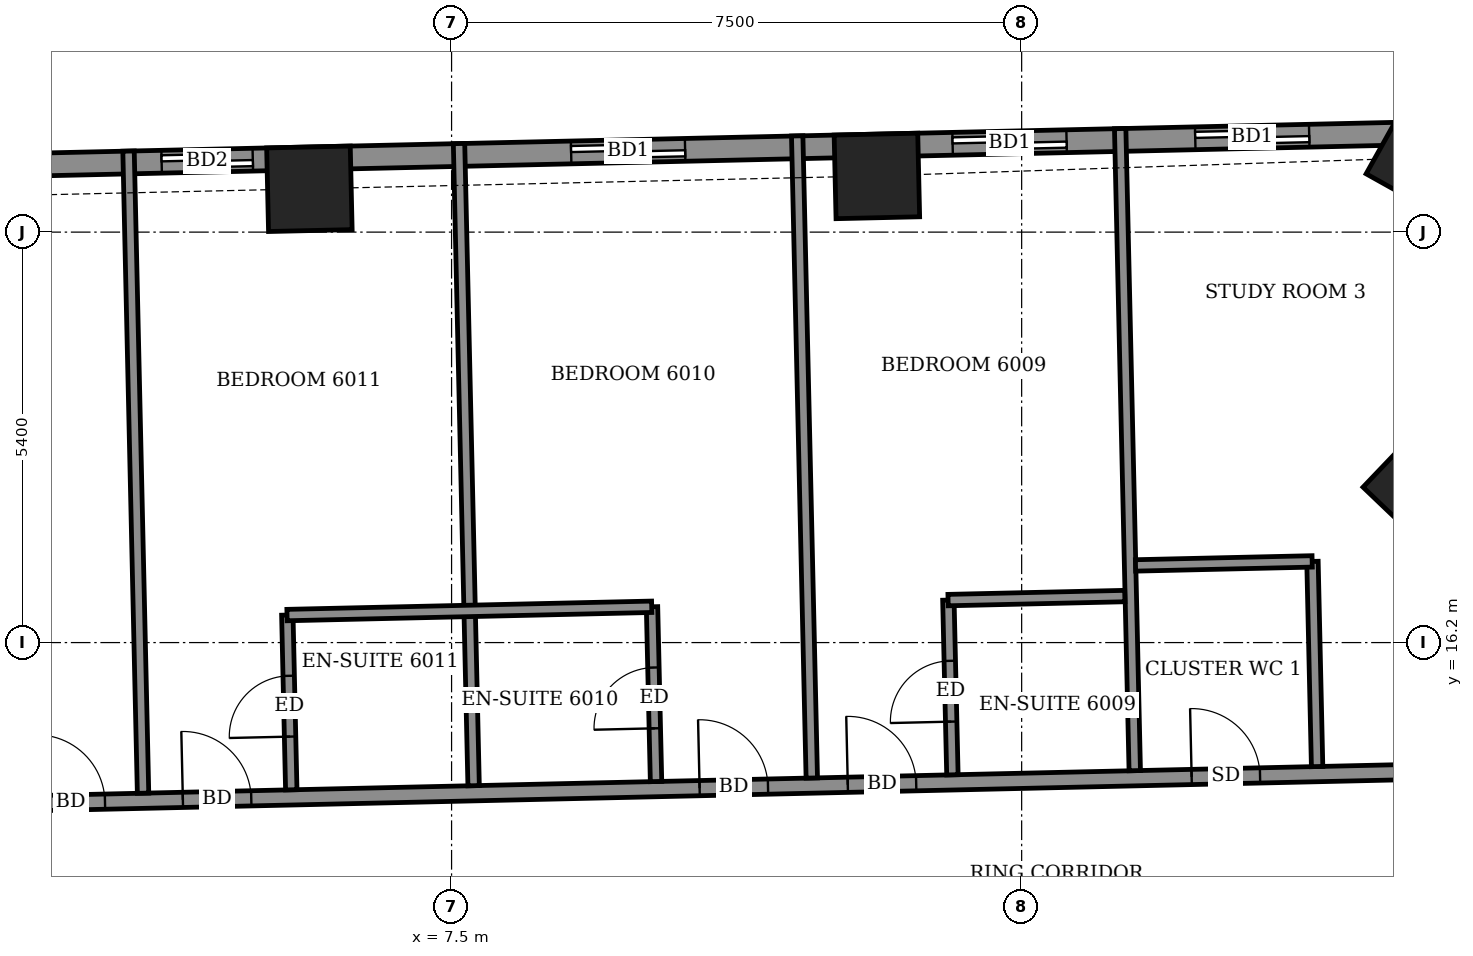
"""IFC4 building model, lengths in metres.
Left out: names, types, materials, properties, quantities, classifications, styles, units other than length and angle.
Written with IfcOpenShell. Run it as: python <this file> out.ifc"""

import sys

from ifc_helpers import new_model, si_unit, direction, frame, frame_2d, origin, origin_2d, place, context, subcontext, project, spatial, rectangle, extrude, element, fill, save


model = new_model("IFC4")
c1 = context("Model", 3, precision=1e-05, world=origin(), true_north=direction((0.0, 1.0)))
c2 = subcontext(c1, "Body", "Model", "MODEL_VIEW")
j1 = project(units=[si_unit("LENGTHUNIT", "METRE"), si_unit("PLANEANGLEUNIT", "RADIAN")], contexts=[c1])
p1 = place(None, origin())
s1 = spatial("IfcSite", under=j1, at=p1, CompositionType="ELEMENT")
p2 = place(p1, origin())
s2 = spatial("IfcBuilding", under=s1, at=p2, CompositionType="ELEMENT")
p3 = place(p2, frame((0.0, 0.0, 238.3)))
s3 = spatial("IfcBuildingStorey", under=s2, at=p3, CompositionType="ELEMENT", Elevation=238.3)
for number, where, z_axis, x_axis in (
    (1, (20.269, 18.262, -0.55), (0.0, 0.0, 1.0), (-0.723, 0.691, 0.0)),
    (2, (20.281, 22.579, -0.55), (0.0, 0.0, 1.0), (-0.873, 0.488, 0.0)),
    (3, (13.095, 22.339, -0.55), (0.0, 0.0, 1.0), (-1.0, -0.023, 0.0)),
    (4, (5.629, 22.17, -0.55), (0.0, 0.0, 1.0), (-1.0, -0.023, 0.0)),
):
    element("IfcColumn", number, at=place(p3, frame(where, z_axis=z_axis, x_axis=x_axis)), inside=s3, PredefinedType="COLUMN", context=c2, shape_type="SweptSolid", body=[
        extrude(rectangle(XDim=1.1, YDim=1.1, at=origin_2d()), origin(), (0.0, 0.0, 1.0), 3.6),
    ])
p4 = place(p3, frame((20.403, 22.905, 0.0), z_axis=(0.0, 0.0, 1.0), x_axis=(-0.99974298964, -0.022670568288, 0.0)))
e5 = element("IfcWall", 5, at=p4, inside=s3, PredefinedType="SOLIDWALL", context=c2, shape_type="SweptSolid", body=[
    extrude(rectangle(XDim=44.509, YDim=0.3, at=frame_2d((22.254, 0.0))), origin(), (0.0, 0.0, 1.0), 2.55),
])
p5 = place(p4, frame((1.62, 0.0, 0.0)))
e6 = element("IfcOpeningElement", 6, at=p5, cuts=e5, PredefinedType="OPENING", context=c2, shape_type="SweptSolid", body=[
    extrude(rectangle(XDim=1.5, YDim=2.4, at=frame_2d((0.75, 1.2))), frame((0.0, 0.16, 0.0), z_axis=(0.0, -1.0, 0.0), x_axis=(1.0, 0.0, 0.0)), (0.0, 0.0, 1.0), 0.32),
])
p6 = place(p4, frame((4.813, 0.0, 0.0)))
e7 = element("IfcOpeningElement", 7, at=p6, cuts=e5, PredefinedType="OPENING", context=c2, shape_type="SweptSolid", body=[
    extrude(rectangle(XDim=1.5, YDim=2.4, at=frame_2d((0.75, 1.2))), frame((0.0, 0.16, 0.0), z_axis=(0.0, -1.0, 0.0), x_axis=(1.0, 0.0, 0.0)), (0.0, 0.0, 1.0), 0.32),
])
p7 = place(p4, frame((9.833, 0.0, 0.0)))
e8 = element("IfcOpeningElement", 8, at=p7, cuts=e5, PredefinedType="OPENING", context=c2, shape_type="SweptSolid", body=[
    extrude(rectangle(XDim=1.5, YDim=2.4, at=frame_2d((0.75, 1.2))), frame((0.0, 0.16, 0.0), z_axis=(0.0, -1.0, 0.0), x_axis=(1.0, 0.0, 0.0)), (0.0, 0.0, 1.0), 0.32),
])
p8 = place(p4, frame((15.522, 0.0, 0.0)))
e9 = element("IfcOpeningElement", 9, at=p8, cuts=e5, PredefinedType="OPENING", context=c2, shape_type="SweptSolid", body=[
    extrude(rectangle(XDim=1.2, YDim=2.4, at=frame_2d((0.6, 1.2))), frame((0.0, 0.16, 0.0), z_axis=(0.0, -1.0, 0.0), x_axis=(1.0, 0.0, 0.0)), (0.0, 0.0, 1.0), 0.32),
])
p9 = place(p4, frame((18.558, 0.0, 0.0)))
e10 = element("IfcOpeningElement", 10, at=p9, cuts=e5, PredefinedType="OPENING", context=c2, shape_type="SweptSolid", body=[
    extrude(rectangle(XDim=1.5, YDim=2.4, at=frame_2d((0.75, 1.2))), frame((0.0, 0.16, 0.0), z_axis=(0.0, -1.0, 0.0), x_axis=(1.0, 0.0, 0.0)), (0.0, 0.0, 1.0), 0.32),
])
p10 = place(p4, frame((23.456, 0.0, 0.0)))
e11 = element("IfcOpeningElement", 11, at=p10, cuts=e5, PredefinedType="OPENING", context=c2, shape_type="SweptSolid", body=[
    extrude(rectangle(XDim=1.5, YDim=2.4, at=frame_2d((0.75, 1.2))), frame((0.0, 0.16, 0.0), z_axis=(0.0, -1.0, 0.0), x_axis=(1.0, 0.0, 0.0)), (0.0, 0.0, 1.0), 0.32),
])
p11 = place(p4, frame((26.89, 0.0, 0.0)))
e12 = element("IfcOpeningElement", 12, at=p11, cuts=e5, PredefinedType="OPENING", context=c2, shape_type="SweptSolid", body=[
    extrude(rectangle(XDim=1.5, YDim=2.4, at=frame_2d((0.75, 1.2))), frame((0.0, 0.16, 0.0), z_axis=(0.0, -1.0, 0.0), x_axis=(1.0, 0.0, 0.0)), (0.0, 0.0, 1.0), 0.32),
])
p12 = place(p4, frame((31.708, 0.0, 0.0)))
e13 = element("IfcOpeningElement", 13, at=p12, cuts=e5, PredefinedType="OPENING", context=c2, shape_type="SweptSolid", body=[
    extrude(rectangle(XDim=1.5, YDim=2.4, at=frame_2d((0.75, 1.2))), frame((0.0, 0.16, 0.0), z_axis=(0.0, -1.0, 0.0), x_axis=(1.0, 0.0, 0.0)), (0.0, 0.0, 1.0), 0.32),
])
p13 = place(p4, frame((35.024, 0.0, 0.0)))
e14 = element("IfcOpeningElement", 14, at=p13, cuts=e5, PredefinedType="OPENING", context=c2, shape_type="SweptSolid", body=[
    extrude(rectangle(XDim=1.5, YDim=2.4, at=frame_2d((0.75, 1.2))), frame((0.0, 0.16, 0.0), z_axis=(0.0, -1.0, 0.0), x_axis=(1.0, 0.0, 0.0)), (0.0, 0.0, 1.0), 0.32),
])
p14 = place(p4, frame((40.173, 0.0, 0.9)))
e15 = element("IfcOpeningElement", 15, at=p14, cuts=e5, PredefinedType="OPENING", context=c2, shape_type="SweptSolid", body=[
    extrude(rectangle(XDim=2.4, YDim=1.5, at=frame_2d((1.2, 0.75))), frame((0.0, 0.16, 0.0), z_axis=(0.0, -1.0, 0.0), x_axis=(1.0, 0.0, 0.0)), (0.0, 0.0, 1.0), 0.32),
])
p15 = place(p3, frame((16.679, 12.918, 0.0), z_axis=(0.0, 0.0, 1.0), x_axis=(0.99974139269, 0.022740882632, 0.0)))
e16 = element("IfcWall", 16, at=p15, inside=s3, PredefinedType="PARTITIONING", context=c2, shape_type="SweptSolid", body=[
    extrude(rectangle(XDim=6.549, YDim=0.2, at=frame_2d((3.274, 0.0))), origin(), (0.0, 0.0, 1.0), 3.05),
])
p16 = place(p15, frame((3.75, 0.0, 0.0)))
e17 = element("IfcOpeningElement", 17, at=p16, cuts=e16, PredefinedType="OPENING", context=c2, shape_type="SweptSolid", body=[
    extrude(rectangle(XDim=1.0, YDim=2.1, at=frame_2d((0.5, 1.05))), frame((0.0, 0.11, 0.0), z_axis=(0.0, -1.0, 0.0), x_axis=(1.0, 0.0, 0.0)), (0.0, 0.0, 1.0), 0.22),
])
p17 = place(p3, frame((-27.652, 13.413, 0.0), z_axis=(0.0, 0.0, 1.0), x_axis=(0.999742610679, 0.022687273792, 0.0)))
e18 = element("IfcWall", 18, at=p17, inside=s3, PredefinedType="PARTITIONING", context=c2, shape_type="SweptSolid", body=[
    extrude(rectangle(XDim=50.857, YDim=0.2, at=frame_2d((25.429, 0.0))), origin(), (0.0, 0.0, 1.0), 3.05),
])
p18 = place(p17, frame((49.179, 0.0, 0.0)))
e19 = element("IfcOpeningElement", 19, at=p18, cuts=e18, PredefinedType="OPENING", context=c2, shape_type="SweptSolid", body=[
    extrude(rectangle(XDim=1.0, YDim=2.1, at=frame_2d((0.5, 1.05))), frame((0.0, 0.11, 0.0), z_axis=(0.0, -1.0, 0.0), x_axis=(1.0, 0.0, 0.0)), (0.0, 0.0, 1.0), 0.22),
])
p19 = place(p17, frame((44.9, 0.0, 0.0)))
e20 = element("IfcOpeningElement", 20, at=p19, cuts=e18, PredefinedType="OPENING", context=c2, shape_type="SweptSolid", body=[
    extrude(rectangle(XDim=0.9, YDim=2.1, at=frame_2d((0.45, 1.05))), frame((0.0, 0.11, 0.0), z_axis=(0.0, -1.0, 0.0), x_axis=(1.0, 0.0, 0.0)), (0.0, 0.0, 1.0), 0.22),
])
p20 = place(p17, frame((40.375, 0.0, 0.0)))
e21 = element("IfcOpeningElement", 21, at=p20, cuts=e18, PredefinedType="OPENING", context=c2, shape_type="SweptSolid", body=[
    extrude(rectangle(XDim=0.9, YDim=2.1, at=frame_2d((0.45, 1.05))), frame((0.0, 0.11, 0.0), z_axis=(0.0, -1.0, 0.0), x_axis=(1.0, 0.0, 0.0)), (0.0, 0.0, 1.0), 0.22),
])
p21 = place(p17, frame((38.425, 0.0, 0.0)))
e22 = element("IfcOpeningElement", 22, at=p21, cuts=e18, PredefinedType="OPENING", context=c2, shape_type="SweptSolid", body=[
    extrude(rectangle(XDim=0.9, YDim=2.1, at=frame_2d((0.45, 1.05))), frame((0.0, 0.11, 0.0), z_axis=(0.0, -1.0, 0.0), x_axis=(1.0, 0.0, 0.0)), (0.0, 0.0, 1.0), 0.22),
])
p22 = place(p17, frame((31.625, 0.0, 0.0)))
e23 = element("IfcOpeningElement", 23, at=p22, cuts=e18, PredefinedType="OPENING", context=c2, shape_type="SweptSolid", body=[
    extrude(rectangle(XDim=0.9, YDim=2.1, at=frame_2d((0.45, 1.05))), frame((0.0, 0.11, 0.0), z_axis=(0.0, -1.0, 0.0), x_axis=(1.0, 0.0, 0.0)), (0.0, 0.0, 1.0), 0.22),
])
p23 = place(p17, frame((29.7, 0.0, 0.0)))
e24 = element("IfcOpeningElement", 24, at=p23, cuts=e18, PredefinedType="OPENING", context=c2, shape_type="SweptSolid", body=[
    extrude(rectangle(XDim=0.9, YDim=2.1, at=frame_2d((0.45, 1.05))), frame((0.0, 0.11, 0.0), z_axis=(0.0, -1.0, 0.0), x_axis=(1.0, 0.0, 0.0)), (0.0, 0.0, 1.0), 0.22),
])
p24 = place(p17, frame((22.95, 0.0, 0.0)))
e25 = element("IfcOpeningElement", 25, at=p24, cuts=e18, PredefinedType="OPENING", context=c2, shape_type="SweptSolid", body=[
    extrude(rectangle(XDim=0.9, YDim=2.1, at=frame_2d((0.45, 1.05))), frame((0.0, 0.11, 0.0), z_axis=(0.0, -1.0, 0.0), x_axis=(1.0, 0.0, 0.0)), (0.0, 0.0, 1.0), 0.22),
])
p25 = place(p17, frame((20.95, 0.0, 0.0)))
e26 = element("IfcOpeningElement", 26, at=p25, cuts=e18, PredefinedType="OPENING", context=c2, shape_type="SweptSolid", body=[
    extrude(rectangle(XDim=0.9, YDim=2.1, at=frame_2d((0.45, 1.05))), frame((0.0, 0.11, 0.0), z_axis=(0.0, -1.0, 0.0), x_axis=(1.0, 0.0, 0.0)), (0.0, 0.0, 1.0), 0.22),
])
p26 = place(p17, frame((14.15, 0.0, 0.0)))
e27 = element("IfcOpeningElement", 27, at=p26, cuts=e18, PredefinedType="OPENING", context=c2, shape_type="SweptSolid", body=[
    extrude(rectangle(XDim=0.9, YDim=2.1, at=frame_2d((0.45, 1.05))), frame((0.0, 0.11, 0.0), z_axis=(0.0, -1.0, 0.0), x_axis=(1.0, 0.0, 0.0)), (0.0, 0.0, 1.0), 0.22),
])
p27 = place(p17, frame((12.2, 0.0, 0.0)))
e28 = element("IfcOpeningElement", 28, at=p27, cuts=e18, PredefinedType="OPENING", context=c2, shape_type="SweptSolid", body=[
    extrude(rectangle(XDim=0.9, YDim=2.1, at=frame_2d((0.45, 1.05))), frame((0.0, 0.11, 0.0), z_axis=(0.0, -1.0, 0.0), x_axis=(1.0, 0.0, 0.0)), (0.0, 0.0, 1.0), 0.22),
])
p28 = place(p17, frame((2.05, 0.0, 0.0)))
e29 = element("IfcOpeningElement", 29, at=p28, cuts=e18, PredefinedType="OPENING", context=c2, shape_type="SweptSolid", body=[
    extrude(rectangle(XDim=1.0, YDim=2.1, at=frame_2d((0.5, 1.05))), frame((0.0, 0.11, 0.0), z_axis=(0.0, -1.0, 0.0), x_axis=(1.0, 0.0, 0.0)), (0.0, 0.0, 1.0), 0.22),
])
p29 = place(p17, frame((7.45, 0.0, 0.0)))
e30 = element("IfcOpeningElement", 30, at=p29, cuts=e18, PredefinedType="OPENING", context=c2, shape_type="SweptSolid", body=[
    extrude(rectangle(XDim=0.9, YDim=2.1, at=frame_2d((0.45, 1.05))), frame((0.0, 0.11, 0.0), z_axis=(0.0, -1.0, 0.0), x_axis=(1.0, 0.0, 0.0)), (0.0, 0.0, 1.0), 0.22),
])
p30 = place(p3, frame((3.441, 14.218, 0.0), z_axis=(0.0, 0.0, 1.0), x_axis=(-0.022593427839, 0.999744735929, 0.0)))
e31 = element("IfcWall", 31, at=p30, inside=s3, PredefinedType="PARTITIONING", context=c2, shape_type="SweptSolid", body=[
    extrude(rectangle(XDim=8.45, YDim=0.15, at=frame_2d((4.225, 0.0))), origin(), (0.0, 0.0, 1.0), 2.5),
])
p31 = place(p3, frame((5.391, 14.263, 0.0), z_axis=(0.0, 0.0, 1.0), x_axis=(-0.022612884682, 0.999744296031, 0.0)))
e32 = element("IfcWall", 32, at=p31, inside=s3, PredefinedType="PARTITIONING", context=c2, shape_type="SweptSolid", body=[
    extrude(rectangle(XDim=2.3, YDim=0.15, at=frame_2d((1.15, 0.0))), origin(), (0.0, 0.0, 1.0), 3.05),
])
p32 = place(p31, frame((0.7, 0.0, 0.0)))
e33 = element("IfcOpeningElement", 33, at=p32, cuts=e32, PredefinedType="OPENING", context=c2, shape_type="SweptSolid", body=[
    extrude(rectangle(XDim=0.8, YDim=2.1, at=frame_2d((0.4, 1.05))), frame((0.0, 0.085, 0.0), z_axis=(0.0, -1.0, 0.0), x_axis=(1.0, 0.0, 0.0)), (0.0, 0.0, 1.0), 0.17),
])
p33 = place(p3, frame((7.79, 14.317, 0.0), z_axis=(0.0, 0.0, 1.0), x_axis=(-0.022737812646, 0.999741462517, 0.0)))
e34 = element("IfcWall", 34, at=p33, inside=s3, PredefinedType="PARTITIONING", context=c2, shape_type="SweptSolid", body=[
    extrude(rectangle(XDim=8.45, YDim=0.15, at=frame_2d((4.225, 0.0))), origin(), (0.0, 0.0, 1.0), 2.5),
])
p34 = place(p3, frame((10.19, 14.372, 0.0), z_axis=(0.0, 0.0, 1.0), x_axis=(-0.023039761813, 0.999734549456, 0.0)))
e35 = element("IfcWall", 35, at=p34, inside=s3, PredefinedType="PARTITIONING", context=c2, shape_type="SweptSolid", body=[
    extrude(rectangle(XDim=2.3, YDim=0.15, at=frame_2d((1.15, 0.0))), origin(), (0.0, 0.0, 1.0), 3.05),
])
p35 = place(p34, frame((0.7, 0.0, 0.0)))
e36 = element("IfcOpeningElement", 36, at=p35, cuts=e35, PredefinedType="OPENING", context=c2, shape_type="SweptSolid", body=[
    extrude(rectangle(XDim=0.8, YDim=2.1, at=frame_2d((0.4, 1.05))), frame((0.0, 0.085, 0.0), z_axis=(0.0, -1.0, 0.0), x_axis=(1.0, 0.0, 0.0)), (0.0, 0.0, 1.0), 0.17),
])
p36 = place(p3, frame((12.239, 14.418, 0.0), z_axis=(0.0, 0.0, 1.0), x_axis=(-0.022708935798, 0.999742118866, 0.0)))
e37 = element("IfcWall", 37, at=p36, inside=s3, PredefinedType="PARTITIONING", context=c2, shape_type="SweptSolid", body=[
    extrude(rectangle(XDim=8.45, YDim=0.15, at=frame_2d((4.225, 0.0))), origin(), (0.0, 0.0, 1.0), 2.5),
])
p37 = place(p3, frame((14.089, 14.46, 0.0), z_axis=(0.0, 0.0, 1.0), x_axis=(-0.023143422514, 0.999732155127, 0.0)))
e38 = element("IfcWall", 38, at=p37, inside=s3, PredefinedType="PARTITIONING", context=c2, shape_type="SweptSolid", body=[
    extrude(rectangle(XDim=2.3, YDim=0.15, at=frame_2d((1.15, 0.0))), origin(), (0.0, 0.0, 1.0), 3.05),
])
p38 = place(p37, frame((0.7, 0.0, 0.0)))
e39 = element("IfcOpeningElement", 39, at=p38, cuts=e38, PredefinedType="OPENING", context=c2, shape_type="SweptSolid", body=[
    extrude(rectangle(XDim=0.8, YDim=2.1, at=frame_2d((0.4, 1.05))), frame((0.0, 0.085, 0.0), z_axis=(0.0, -1.0, 0.0), x_axis=(1.0, 0.0, 0.0)), (0.0, 0.0, 1.0), 0.17),
])
p39 = place(p3, frame((16.488, 14.515, 0.0), z_axis=(0.0, 0.0, 1.0), x_axis=(-0.022740440012, 0.999741402758, 0.0)))
e40 = element("IfcWall", 40, at=p39, inside=s3, PredefinedType="PARTITIONING", context=c2, shape_type="SweptSolid", body=[
    extrude(rectangle(XDim=8.449, YDim=0.15, at=frame_2d((4.225, 0.0))), origin(), (0.0, 0.0, 1.0), 2.55),
])
p40 = place(p3, frame((18.887, 14.569, 0.0), z_axis=(0.0, 0.0, 1.0), x_axis=(-0.02260842146, 0.999744396973, 0.0)))
e41 = element("IfcWall", 41, at=p40, inside=s3, PredefinedType="PARTITIONING", context=c2, shape_type="SweptSolid", body=[
    extrude(rectangle(XDim=2.7, YDim=0.15, at=frame_2d((1.35, 0.0))), origin(), (0.0, 0.0, 1.0), 3.05),
])
p41 = place(p3, frame((5.335, 16.562, 0.0), z_axis=(0.0, 0.0, 1.0), x_axis=(0.999742596585, 0.02268789488, 0.0)))
e42 = element("IfcWall", 42, at=p41, inside=s3, PredefinedType="PARTITIONING", context=c2, shape_type="SweptSolid", body=[
    extrude(rectangle(XDim=4.799, YDim=0.15, at=frame_2d((2.4, 0.0))), origin(), (0.0, 0.0, 1.0), 3.05),
])
p42 = place(p3, frame((14.032, 16.759, 0.0), z_axis=(0.0, 0.0, 1.0), x_axis=(0.999740478815, 0.022781023197, 0.0)))
e43 = element("IfcWall", 43, at=p42, inside=s3, PredefinedType="PARTITIONING", context=c2, shape_type="SweptSolid", body=[
    extrude(rectangle(XDim=2.325, YDim=0.15, at=frame_2d((1.163, 0.0))), origin(), (0.0, 0.0, 1.0), 3.05),
])
p43 = place(p3, frame((16.498, 17.215, 0.0), z_axis=(0.0, 0.0, 1.0), x_axis=(0.999740260747, 0.02279059109, 0.0)))
e44 = element("IfcWall", 44, at=p43, inside=s3, PredefinedType="PARTITIONING", context=c2, shape_type="SweptSolid", body=[
    extrude(rectangle(XDim=2.324, YDim=0.15, at=frame_2d((1.162, 0.0))), origin(), (0.0, 0.0, 1.0), 3.05),
])
p44 = place(p5, origin())
e45 = element("IfcDoor", 45, at=p44, inside=s3, OperationType="SLIDING_TO_LEFT", PredefinedType="DOOR", context=c2, shape_type="SweptSolid", body=[
    extrude(rectangle(XDim=1.5, YDim=2.4, at=frame_2d((0.75, 1.2))), frame((0.0, 0.025, 0.0), z_axis=(0.0, -1.0, 0.0), x_axis=(1.0, 0.0, 0.0)), (0.0, 0.0, 1.0), 0.05),
])
fill(e6, e45)
p45 = place(p6, origin())
e46 = element("IfcDoor", 46, at=p45, inside=s3, OperationType="SLIDING_TO_LEFT", PredefinedType="DOOR", context=c2, shape_type="SweptSolid", body=[
    extrude(rectangle(XDim=1.5, YDim=2.4, at=frame_2d((0.75, 1.2))), frame((0.0, 0.025, 0.0), z_axis=(0.0, -1.0, 0.0), x_axis=(1.0, 0.0, 0.0)), (0.0, 0.0, 1.0), 0.05),
])
fill(e7, e46)
p46 = place(p7, origin())
e47 = element("IfcDoor", 47, at=p46, inside=s3, OperationType="SLIDING_TO_LEFT", PredefinedType="DOOR", context=c2, shape_type="SweptSolid", body=[
    extrude(rectangle(XDim=1.5, YDim=2.4, at=frame_2d((0.75, 1.2))), frame((0.0, 0.025, 0.0), z_axis=(0.0, -1.0, 0.0), x_axis=(1.0, 0.0, 0.0)), (0.0, 0.0, 1.0), 0.05),
])
fill(e8, e47)
p47 = place(p8, origin())
e48 = element("IfcDoor", 48, at=p47, inside=s3, OperationType="SLIDING_TO_LEFT", PredefinedType="DOOR", context=c2, shape_type="SweptSolid", body=[
    extrude(rectangle(XDim=1.2, YDim=2.4, at=frame_2d((0.6, 1.2))), frame((0.0, 0.025, 0.0), z_axis=(0.0, -1.0, 0.0), x_axis=(1.0, 0.0, 0.0)), (0.0, 0.0, 1.0), 0.05),
])
fill(e9, e48)
p48 = place(p19, origin())
e49 = element("IfcDoor", 49, at=p48, inside=s3, OperationType="SINGLE_SWING_RIGHT", PredefinedType="DOOR", context=c2, shape_type="SweptSolid", body=[
    extrude(rectangle(XDim=0.9, YDim=2.1, at=frame_2d((0.45, 1.05))), frame((0.0, 0.025, 0.0), z_axis=(0.0, -1.0, 0.0), x_axis=(1.0, 0.0, 0.0)), (0.0, 0.0, 1.0), 0.05),
])
fill(e20, e49)
p49 = place(p20, origin())
e50 = element("IfcDoor", 50, at=p49, inside=s3, OperationType="SINGLE_SWING_LEFT", PredefinedType="DOOR", context=c2, shape_type="SweptSolid", body=[
    extrude(rectangle(XDim=0.9, YDim=2.1, at=frame_2d((0.45, 1.05))), frame((0.0, 0.025, 0.0), z_axis=(0.0, -1.0, 0.0), x_axis=(1.0, 0.0, 0.0)), (0.0, 0.0, 1.0), 0.05),
])
fill(e21, e50)
p50 = place(p38, origin())
e51 = element("IfcDoor", 51, at=p50, inside=s3, OperationType="SINGLE_SWING_LEFT", PredefinedType="DOOR", context=c2, shape_type="SweptSolid", body=[
    extrude(rectangle(XDim=0.8, YDim=2.1, at=frame_2d((0.4, 1.05))), frame((0.0, 0.025, 0.0), z_axis=(0.0, -1.0, 0.0), x_axis=(1.0, 0.0, 0.0)), (0.0, 0.0, 1.0), 0.05),
])
fill(e39, e51)
p51 = place(p21, origin())
e52 = element("IfcDoor", 52, at=p51, inside=s3, OperationType="SINGLE_SWING_RIGHT", PredefinedType="DOOR", context=c2, shape_type="SweptSolid", body=[
    extrude(rectangle(XDim=0.9, YDim=2.1, at=frame_2d((0.45, 1.05))), frame((0.0, 0.025, 0.0), z_axis=(0.0, -1.0, 0.0), x_axis=(1.0, 0.0, 0.0)), (0.0, 0.0, 1.0), 0.05),
])
fill(e22, e52)
p52 = place(p35, origin())
e53 = element("IfcDoor", 53, at=p52, inside=s3, OperationType="SINGLE_SWING_RIGHT", PredefinedType="DOOR", context=c2, shape_type="SweptSolid", body=[
    extrude(rectangle(XDim=0.8, YDim=2.1, at=frame_2d((0.4, 1.05))), frame((0.0, 0.025, 0.0), z_axis=(0.0, -1.0, 0.0), x_axis=(1.0, 0.0, 0.0)), (0.0, 0.0, 1.0), 0.05),
])
fill(e36, e53)
p53 = place(p22, origin())
e54 = element("IfcDoor", 54, at=p53, inside=s3, OperationType="SINGLE_SWING_LEFT", PredefinedType="DOOR", context=c2, shape_type="SweptSolid", body=[
    extrude(rectangle(XDim=0.9, YDim=2.1, at=frame_2d((0.45, 1.05))), frame((0.0, 0.025, 0.0), z_axis=(0.0, -1.0, 0.0), x_axis=(1.0, 0.0, 0.0)), (0.0, 0.0, 1.0), 0.05),
])
fill(e23, e54)
p54 = place(p32, origin())
e55 = element("IfcDoor", 55, at=p54, inside=s3, OperationType="SINGLE_SWING_LEFT", PredefinedType="DOOR", context=c2, shape_type="SweptSolid", body=[
    extrude(rectangle(XDim=0.8, YDim=2.1, at=frame_2d((0.4, 1.05))), frame((0.0, 0.025, 0.0), z_axis=(0.0, -1.0, 0.0), x_axis=(1.0, 0.0, 0.0)), (0.0, 0.0, 1.0), 0.05),
])
fill(e33, e55)
p55 = place(p23, origin())
e56 = element("IfcDoor", 56, at=p55, inside=s3, OperationType="SINGLE_SWING_RIGHT", PredefinedType="DOOR", context=c2, shape_type="SweptSolid", body=[
    extrude(rectangle(XDim=0.9, YDim=2.1, at=frame_2d((0.45, 1.05))), frame((0.0, 0.025, 0.0), z_axis=(0.0, -1.0, 0.0), x_axis=(1.0, 0.0, 0.0)), (0.0, 0.0, 1.0), 0.05),
])
fill(e24, e56)
save(model, sys.argv[1])
